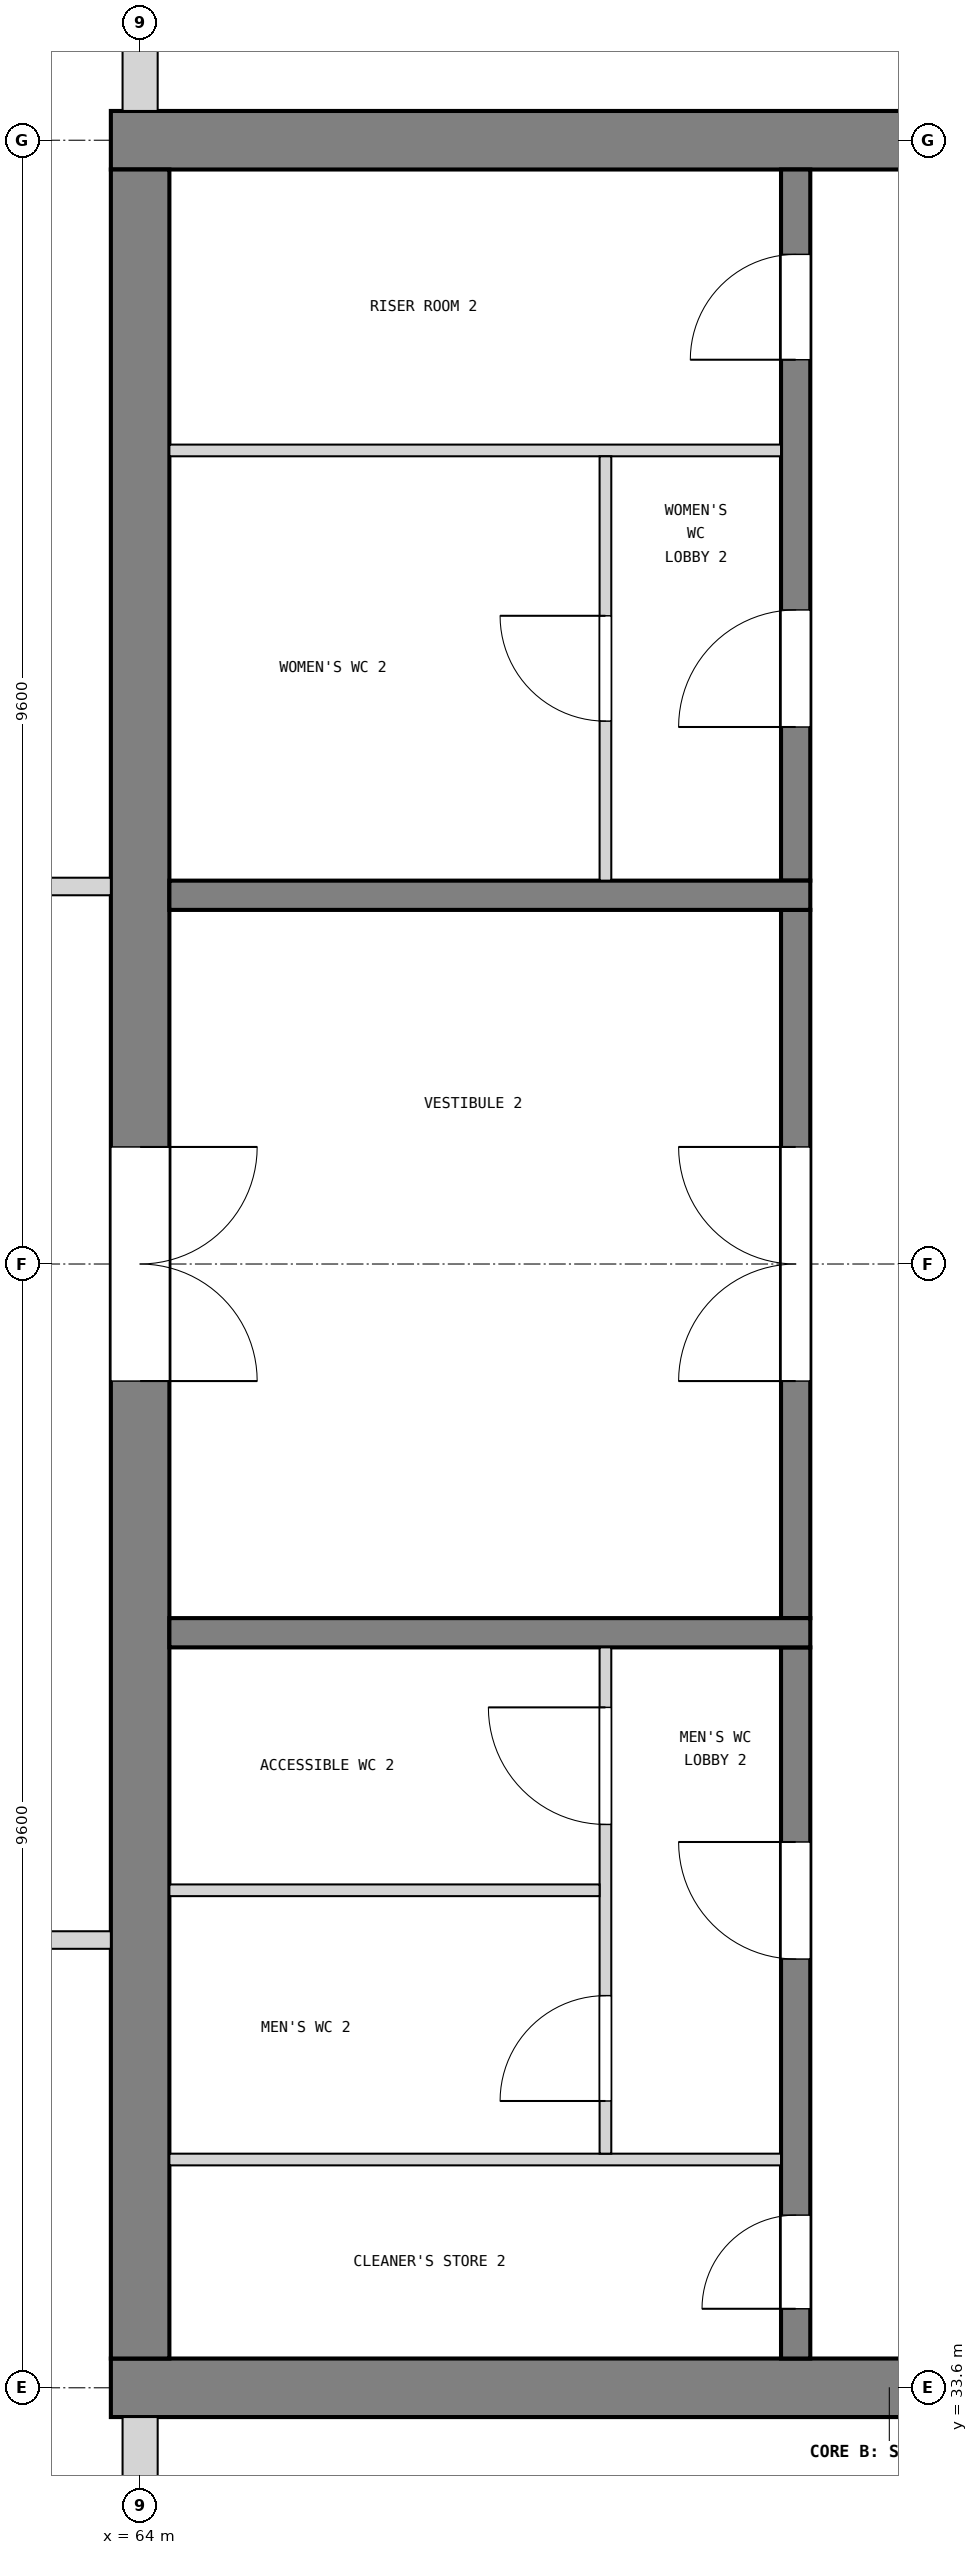
"""IFC4 building model, lengths in metres.
Left out: names, types, materials, properties, quantities, classifications, styles, units other than length and angle.
Written with IfcOpenShell. Run it as: python <this file> out.ifc"""

import sys

from ifc_helpers import new_model, si_unit, direction, frame, frame_2d, origin, place, context, subcontext, project, spatial, rectangle, extrude, element, fill, save


model = new_model("IFC4")
c1 = context("Model", 3, precision=1e-05, world=origin(), true_north=direction((0.0, 1.0)))
c2 = subcontext(c1, "Body", "Model", "MODEL_VIEW")
j1 = project(units=[si_unit("LENGTHUNIT", "METRE"), si_unit("PLANEANGLEUNIT", "RADIAN")], contexts=[c1])
p1 = place(None, origin())
s1 = spatial("IfcSite", under=j1, at=p1, CompositionType="ELEMENT")
p2 = place(p1, origin())
s2 = spatial("IfcBuilding", under=s1, at=p2, CompositionType="ELEMENT")
p3 = place(p2, frame((0.0, 0.0, 28.8)))
s3 = spatial("IfcBuildingStorey", under=s2, at=p3, CompositionType="ELEMENT", Elevation=28.8)
p4 = place(p3, frame((63.75, 52.8, 0.0), z_axis=(0.0, 0.0, 1.0), x_axis=(1.0, 0.0, 0.0)))
e1 = element("IfcWall", 1, at=p4, inside=s3, PredefinedType="SHEAR", context=c2, shape_type="SweptSolid", body=[
    extrude(rectangle(XDim=13.3, YDim=0.5, at=frame_2d((6.65, 0.0))), origin(), (0.0, 0.0, 1.0), 3.9),
])
p5 = place(p4, frame((11.05, 0.0, 1.0)))
e2 = element("IfcOpeningElement", 2, at=p5, cuts=e1, PredefinedType="OPENING", context=c2, shape_type="SweptSolid", body=[
    extrude(rectangle(XDim=0.4, YDim=2.0, at=frame_2d((0.2, 1.0))), frame((0.0, 0.26, 0.0), z_axis=(0.0, -1.0, 0.0), x_axis=(1.0, 0.0, 0.0)), (0.0, 0.0, 1.0), 0.52),
])
p6 = place(p3, frame((63.75, 33.6, 0.0), z_axis=(0.0, 0.0, 1.0), x_axis=(1.0, 0.0, 0.0)))
e3 = element("IfcWall", 3, at=p6, inside=s3, PredefinedType="SHEAR", context=c2, shape_type="SweptSolid", body=[
    extrude(rectangle(XDim=13.3, YDim=0.5, at=frame_2d((6.65, 0.0))), origin(), (0.0, 0.0, 1.0), 3.9),
])
p7 = place(p6, frame((11.05, 0.0, 1.0)))
e4 = element("IfcOpeningElement", 4, at=p7, cuts=e3, PredefinedType="OPENING", context=c2, shape_type="SweptSolid", body=[
    extrude(rectangle(XDim=0.4, YDim=2.0, at=frame_2d((0.2, 1.0))), frame((0.0, 0.26, 0.0), z_axis=(0.0, -1.0, 0.0), x_axis=(1.0, 0.0, 0.0)), (0.0, 0.0, 1.0), 0.52),
])
p8 = place(p3, frame((64.0, 33.85, 0.0), z_axis=(0.0, 0.0, 1.0), x_axis=(0.0, 1.0, 0.0)))
e5 = element("IfcWall", 5, at=p8, inside=s3, PredefinedType="SHEAR", context=c2, shape_type="SweptSolid", body=[
    extrude(rectangle(XDim=18.7, YDim=0.5, at=frame_2d((9.35, 0.0))), origin(), (0.0, 0.0, 1.0), 3.9),
])
p9 = place(p8, frame((8.35, 0.0, 0.0)))
e6 = element("IfcOpeningElement", 6, at=p9, cuts=e5, PredefinedType="OPENING", context=c2, shape_type="SweptSolid", body=[
    extrude(rectangle(XDim=2.0, YDim=2.1, at=frame_2d((1.0, 1.05))), frame((0.0, 0.26, 0.0), z_axis=(0.0, -1.0, 0.0), x_axis=(1.0, 0.0, 0.0)), (0.0, 0.0, 1.0), 0.52),
])
p10 = place(p3, frame((64.0, 31.0, 0.0), z_axis=(0.0, 0.0, 1.0), x_axis=(0.0, 1.0, 0.0)))
e7 = element("IfcWall", 7, at=p10, inside=s3, PredefinedType="SOLIDWALL", context=c2, shape_type="SweptSolid", body=[
    extrude(rectangle(XDim=2.35, YDim=0.3, at=frame_2d((1.175, 0.0))), origin(), (0.0, 0.0, 1.0), 2.88),
])
p11 = place(p3, frame((64.0, 53.05, 0.0), z_axis=(0.0, 0.0, 1.0), x_axis=(0.0, 1.0, 0.0)))
e8 = element("IfcWall", 8, at=p11, inside=s3, PredefinedType="SOLIDWALL", context=c2, shape_type="SweptSolid", body=[
    extrude(rectangle(XDim=2.35, YDim=0.3, at=frame_2d((1.175, 0.0))), origin(), (0.0, 0.0, 1.0), 2.88),
])
p12 = place(p3, frame((69.6, 33.85, 0.0), z_axis=(0.0, 0.0, 1.0), x_axis=(0.0, 1.0, 0.0)))
e9 = element("IfcWall", 9, at=p12, inside=s3, PredefinedType="SOLIDWALL", context=c2, shape_type="SweptSolid", body=[
    extrude(rectangle(XDim=6.075, YDim=0.25, at=frame_2d((3.038, 0.0))), origin(), (0.0, 0.0, 1.0), 3.6),
])
p13 = place(p12, frame((0.425, 0.0, 0.0)))
e10 = element("IfcOpeningElement", 10, at=p13, cuts=e9, PredefinedType="OPENING", context=c2, shape_type="SweptSolid", body=[
    extrude(rectangle(XDim=0.8, YDim=2.1, at=frame_2d((0.4, 1.05))), frame((0.0, 0.135, 0.0), z_axis=(0.0, -1.0, 0.0), x_axis=(1.0, 0.0, 0.0)), (0.0, 0.0, 1.0), 0.27),
])
p14 = place(p12, frame((3.413, 0.0, 0.0)))
e11 = element("IfcOpeningElement", 11, at=p14, cuts=e9, PredefinedType="OPENING", context=c2, shape_type="SweptSolid", body=[
    extrude(rectangle(XDim=1.0, YDim=2.1, at=frame_2d((0.5, 1.05))), frame((0.0, 0.135, 0.0), z_axis=(0.0, -1.0, 0.0), x_axis=(1.0, 0.0, 0.0)), (0.0, 0.0, 1.0), 0.27),
])
p15 = place(p3, frame((69.6, 40.175, 0.0), z_axis=(0.0, 0.0, 1.0), x_axis=(0.0, 1.0, 0.0)))
e12 = element("IfcWall", 12, at=p15, inside=s3, PredefinedType="SOLIDWALL", context=c2, shape_type="SweptSolid", body=[
    extrude(rectangle(XDim=6.05, YDim=0.25, at=frame_2d((3.025, 0.0))), origin(), (0.0, 0.0, 1.0), 3.6),
])
p16 = place(p15, frame((2.025, 0.0, 0.0)))
e13 = element("IfcOpeningElement", 13, at=p16, cuts=e12, PredefinedType="OPENING", context=c2, shape_type="SweptSolid", body=[
    extrude(rectangle(XDim=2.0, YDim=2.1, at=frame_2d((1.0, 1.05))), frame((0.0, 0.135, 0.0), z_axis=(0.0, -1.0, 0.0), x_axis=(1.0, 0.0, 0.0)), (0.0, 0.0, 1.0), 0.27),
])
p17 = place(p3, frame((69.6, 46.475, 0.0), z_axis=(0.0, 0.0, 1.0), x_axis=(0.0, 1.0, 0.0)))
e14 = element("IfcWall", 14, at=p17, inside=s3, PredefinedType="SOLIDWALL", context=c2, shape_type="SweptSolid", body=[
    extrude(rectangle(XDim=6.075, YDim=0.25, at=frame_2d((3.038, 0.0))), origin(), (0.0, 0.0, 1.0), 3.6),
])
p18 = place(p17, frame((1.312, 0.0, 0.0)))
e15 = element("IfcOpeningElement", 15, at=p18, cuts=e14, PredefinedType="OPENING", context=c2, shape_type="SweptSolid", body=[
    extrude(rectangle(XDim=1.0, YDim=2.1, at=frame_2d((0.5, 1.05))), frame((0.0, 0.135, 0.0), z_axis=(0.0, -1.0, 0.0), x_axis=(1.0, 0.0, 0.0)), (0.0, 0.0, 1.0), 0.27),
])
p19 = place(p17, frame((4.45, 0.0, 0.0)))
e16 = element("IfcOpeningElement", 16, at=p19, cuts=e14, PredefinedType="OPENING", context=c2, shape_type="SweptSolid", body=[
    extrude(rectangle(XDim=0.9, YDim=2.1, at=frame_2d((0.45, 1.05))), frame((0.0, 0.135, 0.0), z_axis=(0.0, -1.0, 0.0), x_axis=(1.0, 0.0, 0.0)), (0.0, 0.0, 1.0), 0.27),
])
for number, where, z_axis, x_axis in (
    (17, (69.725, 40.05, 0.0), (0.0, 0.0, 1.0), (-1.0, 0.0, 0.0)),
    (18, (69.725, 46.35, 0.0), (0.0, 0.0, 1.0), (-1.0, 0.0, 0.0)),
):
    element("IfcWall", number, at=place(p3, frame(where, z_axis=z_axis, x_axis=x_axis)), inside=s3, PredefinedType="SOLIDWALL", context=c2, shape_type="SweptSolid", body=[
        extrude(rectangle(XDim=5.475, YDim=0.25, at=frame_2d((2.738, 0.0))), origin(), (0.0, 0.0, 1.0), 3.6),
    ])
p20 = place(p3, frame((69.475, 35.55, 0.0), z_axis=(0.0, 0.0, 1.0), x_axis=(-1.0, 0.0, 0.0)))
e19 = element("IfcWall", 19, at=p20, inside=s3, PredefinedType="PARTITIONING", context=c2, shape_type="SweptSolid", body=[
    extrude(rectangle(XDim=5.225, YDim=0.1, at=frame_2d((2.613, 0.0))), origin(), (0.0, 0.0, 1.0), 3.6),
])
p21 = place(p3, frame((67.975, 35.6, 0.0), z_axis=(0.0, 0.0, 1.0), x_axis=(0.0, 1.0, 0.0)))
e20 = element("IfcWall", 20, at=p21, inside=s3, PredefinedType="PARTITIONING", context=c2, shape_type="SweptSolid", body=[
    extrude(rectangle(XDim=4.325, YDim=0.1, at=frame_2d((2.163, 0.0))), origin(), (0.0, 0.0, 1.0), 3.6),
])
p22 = place(p21, frame((0.45, 0.0, 0.0)))
e21 = element("IfcOpeningElement", 21, at=p22, cuts=e20, PredefinedType="OPENING", context=c2, shape_type="SweptSolid", body=[
    extrude(rectangle(XDim=0.9, YDim=2.1, at=frame_2d((0.45, 1.05))), frame((0.0, 0.06, 0.0), z_axis=(0.0, -1.0, 0.0), x_axis=(1.0, 0.0, 0.0)), (0.0, 0.0, 1.0), 0.12),
])
p23 = place(p21, frame((2.812, 0.0, 0.0)))
e22 = element("IfcOpeningElement", 22, at=p23, cuts=e20, PredefinedType="OPENING", context=c2, shape_type="SweptSolid", body=[
    extrude(rectangle(XDim=1.0, YDim=2.1, at=frame_2d((0.5, 1.05))), frame((0.0, 0.06, 0.0), z_axis=(0.0, -1.0, 0.0), x_axis=(1.0, 0.0, 0.0)), (0.0, 0.0, 1.0), 0.12),
])
p24 = place(p3, frame((67.925, 37.85, 0.0), z_axis=(0.0, 0.0, 1.0), x_axis=(-1.0, 0.0, 0.0)))
e23 = element("IfcWall", 23, at=p24, inside=s3, PredefinedType="PARTITIONING", context=c2, shape_type="SweptSolid", body=[
    extrude(rectangle(XDim=3.675, YDim=0.1, at=frame_2d((1.837, 0.0))), origin(), (0.0, 0.0, 1.0), 3.6),
])
p25 = place(p3, frame((69.475, 50.15, 0.0), z_axis=(0.0, 0.0, 1.0), x_axis=(-1.0, 0.0, 0.0)))
e24 = element("IfcWall", 24, at=p25, inside=s3, PredefinedType="PARTITIONING", context=c2, shape_type="SweptSolid", body=[
    extrude(rectangle(XDim=5.225, YDim=0.1, at=frame_2d((2.613, 0.0))), origin(), (0.0, 0.0, 1.0), 3.6),
])
p26 = place(p3, frame((67.975, 46.475, 0.0), z_axis=(0.0, 0.0, 1.0), x_axis=(0.0, 1.0, 0.0)))
e25 = element("IfcWall", 25, at=p26, inside=s3, PredefinedType="PARTITIONING", context=c2, shape_type="SweptSolid", body=[
    extrude(rectangle(XDim=3.625, YDim=0.1, at=frame_2d((1.812, 0.0))), origin(), (0.0, 0.0, 1.0), 3.6),
])
p27 = place(p26, frame((1.363, 0.0, 0.0)))
e26 = element("IfcOpeningElement", 26, at=p27, cuts=e25, PredefinedType="OPENING", context=c2, shape_type="SweptSolid", body=[
    extrude(rectangle(XDim=0.9, YDim=2.1, at=frame_2d((0.45, 1.05))), frame((0.0, 0.06, 0.0), z_axis=(0.0, -1.0, 0.0), x_axis=(1.0, 0.0, 0.0)), (0.0, 0.0, 1.0), 0.12),
])
p28 = place(p3, frame((55.91, 37.425, 0.0), z_axis=(0.0, 0.0, 1.0), x_axis=(1.0, 0.0, 0.0)))
e27 = element("IfcWall", 27, at=p28, inside=s3, PredefinedType="PARTITIONING", context=c2, shape_type="SweptSolid", body=[
    extrude(rectangle(XDim=7.84, YDim=0.15, at=frame_2d((3.92, 0.0))), origin(), (0.0, 0.0, 1.0), 3.68),
])
p29 = place(p28, frame((3.04, 0.0, 0.0)))
e28 = element("IfcOpeningElement", 28, at=p29, cuts=e27, PredefinedType="OPENING", context=c2, shape_type="SweptSolid", body=[
    extrude(rectangle(XDim=1.8, YDim=2.1, at=frame_2d((0.9, 1.05))), frame((0.0, 0.085, 0.0), z_axis=(0.0, -1.0, 0.0), x_axis=(1.0, 0.0, 0.0)), (0.0, 0.0, 1.0), 0.17),
])
p30 = place(p3, frame((57.78, 46.425, 0.0), z_axis=(0.0, 0.0, 1.0), x_axis=(1.0, 0.0, 0.0)))
e29 = element("IfcWall", 29, at=p30, inside=s3, PredefinedType="PARTITIONING", context=c2, shape_type="SweptSolid", body=[
    extrude(rectangle(XDim=5.97, YDim=0.15, at=frame_2d((2.985, 0.0))), origin(), (0.0, 0.0, 1.0), 3.68),
])
p31 = place(p30, frame((2.52, 0.0, 0.0)))
e30 = element("IfcOpeningElement", 30, at=p31, cuts=e29, PredefinedType="OPENING", context=c2, shape_type="SweptSolid", body=[
    extrude(rectangle(XDim=1.0, YDim=2.1, at=frame_2d((0.5, 1.05))), frame((0.0, 0.085, 0.0), z_axis=(0.0, -1.0, 0.0), x_axis=(1.0, 0.0, 0.0)), (0.0, 0.0, 1.0), 0.17),
])
p32 = place(p16, origin())
e31 = element("IfcDoor", 31, at=p32, inside=s3, OperationType="DOUBLE_DOOR_SINGLE_SWING", PredefinedType="DOOR", context=c2, shape_type="SweptSolid", body=[
    extrude(rectangle(XDim=2.0, YDim=2.1, at=frame_2d((1.0, 1.05))), frame((0.0, 0.025, 0.0), z_axis=(0.0, -1.0, 0.0), x_axis=(1.0, 0.0, 0.0)), (0.0, 0.0, 1.0), 0.05),
])
fill(e13, e31)
p33 = place(p9, frame((2.0, 0.0, 0.0), z_axis=(0.0, 0.0, 1.0), x_axis=(-1.0, 0.0, 0.0)))
e32 = element("IfcDoor", 32, at=p33, inside=s3, OperationType="DOUBLE_DOOR_SINGLE_SWING", PredefinedType="DOOR", context=c2, shape_type="SweptSolid", body=[
    extrude(rectangle(XDim=2.0, YDim=2.1, at=frame_2d((1.0, 1.05))), frame((0.0, 0.025, 0.0), z_axis=(0.0, -1.0, 0.0), x_axis=(1.0, 0.0, 0.0)), (0.0, 0.0, 1.0), 0.05),
])
fill(e6, e32)
p34 = place(p13, origin())
e33 = element("IfcDoor", 33, at=p34, inside=s3, OperationType="SINGLE_SWING_LEFT", PredefinedType="DOOR", context=c2, shape_type="SweptSolid", body=[
    extrude(rectangle(XDim=0.8, YDim=2.1, at=frame_2d((0.4, 1.05))), frame((0.0, 0.025, 0.0), z_axis=(0.0, -1.0, 0.0), x_axis=(1.0, 0.0, 0.0)), (0.0, 0.0, 1.0), 0.05),
])
fill(e10, e33)
p35 = place(p14, origin())
e34 = element("IfcDoor", 34, at=p35, inside=s3, OperationType="SINGLE_SWING_RIGHT", PredefinedType="DOOR", context=c2, shape_type="SweptSolid", body=[
    extrude(rectangle(XDim=1.0, YDim=2.1, at=frame_2d((0.5, 1.05))), frame((0.0, 0.025, 0.0), z_axis=(0.0, -1.0, 0.0), x_axis=(1.0, 0.0, 0.0)), (0.0, 0.0, 1.0), 0.05),
])
fill(e11, e34)
p36 = place(p22, origin())
e35 = element("IfcDoor", 35, at=p36, inside=s3, OperationType="SINGLE_SWING_LEFT", PredefinedType="DOOR", context=c2, shape_type="SweptSolid", body=[
    extrude(rectangle(XDim=0.9, YDim=2.1, at=frame_2d((0.45, 1.05))), frame((0.0, 0.025, 0.0), z_axis=(0.0, -1.0, 0.0), x_axis=(1.0, 0.0, 0.0)), (0.0, 0.0, 1.0), 0.05),
])
fill(e21, e35)
p37 = place(p23, origin())
e36 = element("IfcDoor", 36, at=p37, inside=s3, OperationType="SINGLE_SWING_RIGHT", PredefinedType="DOOR", context=c2, shape_type="SweptSolid", body=[
    extrude(rectangle(XDim=1.0, YDim=2.1, at=frame_2d((0.5, 1.05))), frame((0.0, 0.025, 0.0), z_axis=(0.0, -1.0, 0.0), x_axis=(1.0, 0.0, 0.0)), (0.0, 0.0, 1.0), 0.05),
])
fill(e22, e36)
p38 = place(p18, origin())
e37 = element("IfcDoor", 37, at=p38, inside=s3, OperationType="SINGLE_SWING_LEFT", PredefinedType="DOOR", context=c2, shape_type="SweptSolid", body=[
    extrude(rectangle(XDim=1.0, YDim=2.1, at=frame_2d((0.5, 1.05))), frame((0.0, 0.025, 0.0), z_axis=(0.0, -1.0, 0.0), x_axis=(1.0, 0.0, 0.0)), (0.0, 0.0, 1.0), 0.05),
])
fill(e15, e37)
p39 = place(p27, origin())
e38 = element("IfcDoor", 38, at=p39, inside=s3, OperationType="SINGLE_SWING_RIGHT", PredefinedType="DOOR", context=c2, shape_type="SweptSolid", body=[
    extrude(rectangle(XDim=0.9, YDim=2.1, at=frame_2d((0.45, 1.05))), frame((0.0, 0.025, 0.0), z_axis=(0.0, -1.0, 0.0), x_axis=(1.0, 0.0, 0.0)), (0.0, 0.0, 1.0), 0.05),
])
fill(e26, e38)
p40 = place(p19, origin())
e39 = element("IfcDoor", 39, at=p40, inside=s3, OperationType="SINGLE_SWING_LEFT", PredefinedType="DOOR", context=c2, shape_type="SweptSolid", body=[
    extrude(rectangle(XDim=0.9, YDim=2.1, at=frame_2d((0.45, 1.05))), frame((0.0, 0.025, 0.0), z_axis=(0.0, -1.0, 0.0), x_axis=(1.0, 0.0, 0.0)), (0.0, 0.0, 1.0), 0.05),
])
fill(e16, e39)
save(model, sys.argv[1])
